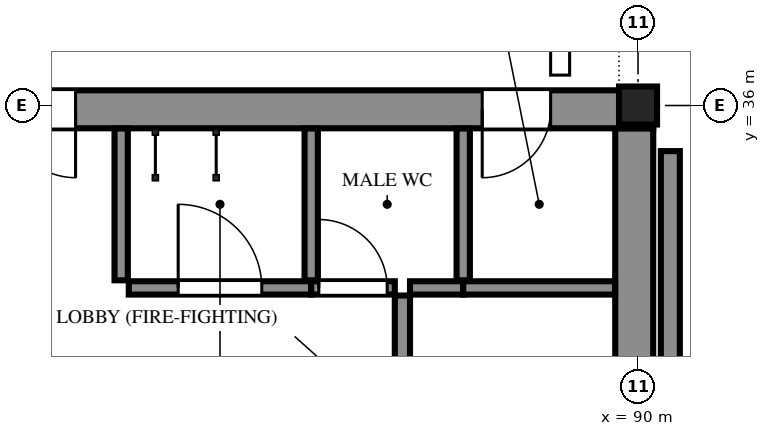
"""IFC4 building model, lengths in metres.
Left out: names, types, materials, properties, quantities, classifications, styles, units other than length and angle.
Written with IfcOpenShell. Run it as: python <this file> out.ifc"""

import sys

from ifc_helpers import new_model, si_unit, direction, frame, frame_2d, origin, origin_2d, place, context, subcontext, project, spatial, polyline, rectangle, hollow_rectangle, outline, extrude, element, fill, save


model = new_model("IFC4")
c1 = context("Model", 3, precision=1e-05, world=origin(), true_north=direction((0.0, 1.0)))
c2 = subcontext(c1, "Body", "Model", "MODEL_VIEW")
j1 = project(units=[si_unit("LENGTHUNIT", "METRE"), si_unit("PLANEANGLEUNIT", "RADIAN")], contexts=[c1])
p1 = place(None, origin())
s1 = spatial("IfcSite", under=j1, at=p1, CompositionType="ELEMENT")
p2 = place(p1, origin())
s2 = spatial("IfcBuilding", under=s1, at=p2, CompositionType="ELEMENT")
p3 = place(p2, frame((0.0, 0.0, 11.7)))
s3 = spatial("IfcBuildingStorey", under=s2, at=p3, CompositionType="ELEMENT", Elevation=11.7)
p4 = place(p3, frame((90.0, 36.0, 0.0), z_axis=(0.0, 0.0, 1.0), x_axis=(1.0, 0.0, 0.0)))
e1 = element("IfcColumn", 1, at=p4, inside=s3, PredefinedType="COLUMN", context=c2, shape_type="SweptSolid", body=[
    extrude(hollow_rectangle(XDim=0.5, YDim=0.5, WallThickness=0.032, at=origin_2d()), origin(), (0.0, 0.0, 1.0), 4.2),
])
p5 = place(p3, frame((71.8, 35.95, 0.0), z_axis=(0.0, 0.0, 1.0), x_axis=(1.0, 0.0, 0.0)))
e2 = element("IfcWall", 2, at=p5, inside=s3, PredefinedType="SOLIDWALL", context=c2, shape_type="SweptSolid", body=[
    extrude(rectangle(XDim=18.4, YDim=0.5, at=frame_2d((9.2, 0.0))), origin(), (0.0, 0.0, 1.0), 4.2),
])
p6 = place(p5, frame((1.5, 0.0, 0.0)))
e3 = element("IfcOpeningElement", 3, at=p6, cuts=e2, PredefinedType="OPENING", context=c2, shape_type="SweptSolid", body=[
    extrude(rectangle(XDim=1.8, YDim=2.1, at=frame_2d((0.9, 1.05))), frame((0.0, 0.26, 0.0), z_axis=(0.0, -1.0, 0.0), x_axis=(1.0, 0.0, 0.0)), (0.0, 0.0, 1.0), 0.52),
])
p7 = place(p5, frame((5.5, 0.0, 0.0)))
e4 = element("IfcOpeningElement", 4, at=p7, cuts=e2, PredefinedType="OPENING", context=c2, shape_type="SweptSolid", body=[
    extrude(rectangle(XDim=1.8, YDim=2.1, at=frame_2d((0.9, 1.05))), frame((0.0, 0.26, 0.0), z_axis=(0.0, -1.0, 0.0), x_axis=(1.0, 0.0, 0.0)), (0.0, 0.0, 1.0), 0.52),
])
p8 = place(p5, frame((9.0, 0.0, 0.0)))
e5 = element("IfcOpeningElement", 5, at=p8, cuts=e2, PredefinedType="OPENING", context=c2, shape_type="SweptSolid", body=[
    extrude(rectangle(XDim=1.8, YDim=2.1, at=frame_2d((0.9, 1.05))), frame((0.0, 0.26, 0.0), z_axis=(0.0, -1.0, 0.0), x_axis=(1.0, 0.0, 0.0)), (0.0, 0.0, 1.0), 0.52),
])
p9 = place(p5, frame((16.15, 0.0, 0.0)))
e6 = element("IfcOpeningElement", 6, at=p9, cuts=e2, PredefinedType="OPENING", context=c2, shape_type="SweptSolid", body=[
    extrude(rectangle(XDim=0.9, YDim=2.1, at=frame_2d((0.45, 1.05))), frame((0.0, 0.26, 0.0), z_axis=(0.0, -1.0, 0.0), x_axis=(1.0, 0.0, 0.0)), (0.0, 0.0, 1.0), 0.52),
])
p10 = place(p3, frame((89.95, 27.3, 0.0), z_axis=(0.0, 0.0, 1.0), x_axis=(0.0, 1.0, 0.0)))
e7 = element("IfcWall", 7, at=p10, inside=s3, PredefinedType="SOLIDWALL", context=c2, shape_type="SweptSolid", body=[
    extrude(rectangle(XDim=8.4, YDim=0.5, at=frame_2d((4.2, 0.0))), origin(), (0.0, 0.0, 1.0), 4.2),
])
p11 = place(p3, frame((90.425, 26.7, 0.0), z_axis=(0.0, 0.0, 1.0), x_axis=(0.0, 1.0, 0.0)))
e8 = element("IfcWall", 8, at=p11, inside=s3, PredefinedType="SOLIDWALL", context=c2, shape_type="SweptSolid", body=[
    extrude(outline(polyline([(0.0, 0.0), (8.7, 0.0), (8.7, 12.6), (0.0, 12.6), (0.0, 0.0)]), holes=[polyline([(2.056, 2.215), (2.076, 2.329), (2.108, 2.439), (2.152, 2.546), (2.208, 2.646), (2.275, 2.74), (2.352, 2.826), (2.438, 2.903), (2.532, 2.969), (2.633, 3.025), (2.739, 3.068), (2.85, 3.1), (2.961, 3.068), (3.067, 3.025), (3.168, 2.969), (3.262, 2.903), (3.348, 2.826), (3.425, 2.74), (3.492, 2.646), (3.548, 2.546), (3.592, 2.439), (3.624, 2.329), (3.644, 2.215), (3.65, 2.1), (3.65, 0.6), (2.05, 0.6), (2.05, 2.1), (2.056, 2.215)]), polyline([(5.076, 2.329), (5.108, 2.439), (5.152, 2.546), (5.208, 2.646), (5.275, 2.74), (5.352, 2.826), (5.438, 2.903), (5.532, 2.969), (5.633, 3.025), (5.739, 3.068), (5.85, 3.1), (5.961, 3.068), (6.067, 3.025), (6.168, 2.969), (6.262, 2.903), (6.348, 2.826), (6.425, 2.74), (6.492, 2.646), (6.548, 2.546), (6.592, 2.439), (6.624, 2.329), (6.644, 2.215), (6.65, 2.1), (6.65, 0.6), (5.05, 0.6), (5.05, 2.1), (5.056, 2.215), (5.076, 2.329)]), polyline([(2.076, 6.529), (2.108, 6.639), (2.152, 6.746), (2.208, 6.846), (2.275, 6.94), (2.352, 7.026), (2.438, 7.103), (2.532, 7.169), (2.633, 7.225), (2.739, 7.269), (2.85, 7.3), (2.961, 7.269), (3.067, 7.225), (3.168, 7.169), (3.262, 7.103), (3.348, 7.026), (3.425, 6.94), (3.492, 6.846), (3.548, 6.746), (3.592, 6.639), (3.624, 6.529), (3.644, 6.415), (3.65, 6.3), (3.65, 4.8), (2.05, 4.8), (2.05, 6.3), (2.056, 6.415), (2.076, 6.529)]), polyline([(5.056, 6.415), (5.076, 6.529), (5.108, 6.639), (5.152, 6.746), (5.208, 6.846), (5.275, 6.94), (5.352, 7.026), (5.438, 7.103), (5.532, 7.169), (5.633, 7.225), (5.739, 7.269), (5.85, 7.3), (5.961, 7.269), (6.067, 7.225), (6.168, 7.169), (6.262, 7.103), (6.348, 7.026), (6.425, 6.94), (6.492, 6.846), (6.548, 6.746), (6.592, 6.639), (6.624, 6.529), (6.644, 6.415), (6.65, 6.3), (6.65, 4.8), (5.05, 4.8), (5.05, 6.3), (5.056, 6.415)]), polyline([(2.076, 10.729), (2.108, 10.839), (2.152, 10.946), (2.208, 11.046), (2.275, 11.14), (2.352, 11.226), (2.438, 11.303), (2.532, 11.369), (2.633, 11.425), (2.739, 11.469), (2.85, 11.5), (2.961, 11.469), (3.067, 11.425), (3.168, 11.369), (3.262, 11.303), (3.348, 11.226), (3.425, 11.14), (3.492, 11.046), (3.548, 10.946), (3.592, 10.839), (3.624, 10.729), (3.644, 10.615), (3.65, 10.5), (3.65, 9.0), (2.05, 9.0), (2.05, 10.5), (2.056, 10.615), (2.076, 10.729)]), polyline([(5.076, 10.729), (5.108, 10.839), (5.152, 10.946), (5.208, 11.046), (5.275, 11.14), (5.352, 11.226), (5.438, 11.303), (5.532, 11.369), (5.633, 11.425), (5.739, 11.469), (5.85, 11.5), (5.961, 11.469), (6.067, 11.425), (6.168, 11.369), (6.262, 11.303), (6.348, 11.226), (6.425, 11.14), (6.492, 11.046), (6.548, 10.946), (6.592, 10.839), (6.624, 10.729), (6.644, 10.615), (6.65, 10.5), (6.65, 9.0), (5.05, 9.0), (5.05, 10.5), (5.056, 10.615), (5.076, 10.729)])]), frame((0.0, 0.125, 0.0), z_axis=(0.0, -1.0, 0.0), x_axis=(1.0, 0.0, 0.0)), (0.0, 0.0, 1.0), 0.25),
])
p12 = place(p3, frame((86.9, 33.5, 0.0), z_axis=(0.0, 0.0, 1.0), x_axis=(0.0, -1.0, 0.0)))
e9 = element("IfcWall", 9, at=p12, inside=s3, PredefinedType="PARTITIONING", context=c2, shape_type="SweptSolid", body=[
    extrude(rectangle(XDim=3.1, YDim=0.2, at=frame_2d((1.55, 0.0))), origin(), (0.0, 0.0, 1.0), 3.382),
])
p13 = place(p12, frame((0.9, 0.0, 0.0)))
e10 = element("IfcOpeningElement", 10, at=p13, cuts=e9, PredefinedType="OPENING", context=c2, shape_type="SweptSolid", body=[
    extrude(rectangle(XDim=1.2, YDim=2.1, at=frame_2d((0.6, 1.05))), frame((0.0, 0.11, 0.0), z_axis=(0.0, -1.0, 0.0), x_axis=(1.0, 0.0, 0.0)), (0.0, 0.0, 1.0), 0.22),
])
p14 = place(p3, frame((83.2, 35.698, 0.0), z_axis=(0.0, 0.0, 1.0), x_axis=(0.0, -1.0, 0.0)))
e11 = element("IfcWall", 11, at=p14, inside=s3, PredefinedType="PARTITIONING", context=c2, shape_type="SweptSolid", body=[
    extrude(rectangle(XDim=1.998, YDim=0.175, at=frame_2d((0.999, 0.0))), origin(), (0.0, 0.0, 1.0), 3.307),
])
p15 = place(p3, frame((83.3, 33.6, 0.0), z_axis=(0.0, 0.0, 1.0), x_axis=(1.0, 0.0, 0.0)))
e12 = element("IfcWall", 12, at=p15, inside=s3, PredefinedType="PARTITIONING", context=c2, shape_type="SweptSolid", body=[
    extrude(rectangle(XDim=2.4, YDim=0.175, at=frame_2d((1.2, 0.0))), origin(), (0.0, 0.0, 1.0), 3.307),
])
p16 = place(p15, frame((0.65, 0.0, 0.0)))
e13 = element("IfcOpeningElement", 13, at=p16, cuts=e12, PredefinedType="OPENING", context=c2, shape_type="SweptSolid", body=[
    extrude(rectangle(XDim=1.1, YDim=2.1, at=frame_2d((0.55, 1.05))), frame((0.0, 0.097, 0.0), z_axis=(0.0, -1.0, 0.0), x_axis=(1.0, 0.0, 0.0)), (0.0, 0.0, 1.0), 0.195),
])
p17 = place(p3, frame((85.7, 33.6, 0.0), z_axis=(0.0, 0.0, 1.0), x_axis=(1.0, 0.0, 0.0)))
e14 = element("IfcWall", 14, at=p17, inside=s3, PredefinedType="PARTITIONING", context=c2, shape_type="SweptSolid", body=[
    extrude(rectangle(XDim=1.1, YDim=0.175, at=frame_2d((0.55, 0.0))), origin(), (0.0, 0.0, 1.0), 3.307),
])
p18 = place(p17, frame((0.1, 0.0, 0.0)))
e15 = element("IfcOpeningElement", 15, at=p18, cuts=e14, PredefinedType="OPENING", context=c2, shape_type="SweptSolid", body=[
    extrude(rectangle(XDim=0.9, YDim=2.1, at=frame_2d((0.45, 1.05))), frame((0.0, 0.097, 0.0), z_axis=(0.0, -1.0, 0.0), x_axis=(1.0, 0.0, 0.0)), (0.0, 0.0, 1.0), 0.195),
])
p19 = place(p3, frame((87.0, 33.6, 0.0), z_axis=(0.0, 0.0, 1.0), x_axis=(1.0, 0.0, 0.0)))
e16 = element("IfcWall", 16, at=p19, inside=s3, PredefinedType="PARTITIONING", context=c2, shape_type="SweptSolid", body=[
    extrude(rectangle(XDim=0.7, YDim=0.175, at=frame_2d((0.35, 0.0))), origin(), (0.0, 0.0, 1.0), 3.307),
])
for number, where, z_axis, x_axis in (
    (17, (87.7, 33.6, 0.0), (0.0, 0.0, 1.0), (1.0, 0.0, 0.0)),
    (18, (85.7, 35.698, 0.0), (0.0, 0.0, 1.0), (0.0, -1.0, 0.0)),
    (19, (87.7, 35.698, 0.0), (0.0, 0.0, 1.0), (0.0, -1.0, 0.0)),
):
    element("IfcWall", number, at=place(p3, frame(where, z_axis=z_axis, x_axis=x_axis)), inside=s3, PredefinedType="PARTITIONING", context=c2, shape_type="SweptSolid", body=[
        extrude(rectangle(XDim=1.998, YDim=0.175, at=frame_2d((0.999, 0.0))), origin(), (0.0, 0.0, 1.0), 3.307),
    ])
p20 = place(p8, frame((1.8, 0.0, 0.0), z_axis=(0.0, 0.0, 1.0), x_axis=(-1.0, 0.0, 0.0)))
e20 = element("IfcDoor", 20, at=p20, inside=s3, OperationType="DOUBLE_DOOR_SINGLE_SWING", PredefinedType="DOOR", context=c2, shape_type="SweptSolid", body=[
    extrude(outline(polyline([(0.0, 0.0), (0.07, 0.0), (0.07, 2.03), (1.73, 2.03), (1.73, 0.0), (1.8, 0.0), (1.8, 2.1), (0.0, 2.1), (0.0, 0.0)])), frame((0.0, 0.025, 0.0), z_axis=(0.0, -1.0, 0.0), x_axis=(1.0, 0.0, 0.0)), (0.0, 0.0, 1.0), 0.05),
    extrude(outline(polyline([(0.074, 0.01), (0.897, 0.01), (0.897, 2.026), (0.074, 2.026), (0.074, 0.01)]), holes=[polyline([(0.194, 0.16), (0.777, 0.16), (0.777, 1.01), (0.194, 1.01), (0.194, 0.16)]), polyline([(0.335, 1.16), (0.635, 1.16), (0.635, 1.76), (0.335, 1.76), (0.335, 1.16)])]), frame((0.0, 0.017, 0.0), z_axis=(0.0, -1.0, 0.0), x_axis=(1.0, 0.0, 0.0)), (0.0, 0.0, 1.0), 0.035),
    extrude(rectangle(XDim=0.583, YDim=0.85, at=frame_2d((0.485, 0.585))), frame((0.0, 0.009, 0.0), z_axis=(0.0, -1.0, 0.0), x_axis=(1.0, 0.0, 0.0)), (0.0, 0.0, 1.0), 0.017),
    extrude(rectangle(XDim=0.3, YDim=0.6, at=frame_2d((0.485, 1.46))), frame((0.0, 0.006, 0.0), z_axis=(0.0, -1.0, 0.0), x_axis=(1.0, 0.0, 0.0)), (0.0, 0.0, 1.0), 0.012),
    extrude(outline(polyline([(0.903, 0.01), (1.726, 0.01), (1.726, 2.026), (0.903, 2.026), (0.903, 0.01)]), holes=[polyline([(1.023, 0.16), (1.606, 0.16), (1.606, 1.01), (1.023, 1.01), (1.023, 0.16)]), polyline([(1.165, 1.16), (1.465, 1.16), (1.465, 1.76), (1.165, 1.76), (1.165, 1.16)])]), frame((0.0, 0.017, 0.0), z_axis=(0.0, -1.0, 0.0), x_axis=(1.0, 0.0, 0.0)), (0.0, 0.0, 1.0), 0.035),
    extrude(rectangle(XDim=0.583, YDim=0.85, at=frame_2d((1.314, 0.585))), frame((0.0, 0.009, 0.0), z_axis=(0.0, -1.0, 0.0), x_axis=(1.0, 0.0, 0.0)), (0.0, 0.0, 1.0), 0.017),
    extrude(rectangle(XDim=0.3, YDim=0.6, at=frame_2d((1.314, 1.46))), frame((0.0, 0.006, 0.0), z_axis=(0.0, -1.0, 0.0), x_axis=(1.0, 0.0, 0.0)), (0.0, 0.0, 1.0), 0.012),
])
fill(e5, e20)
p21 = place(p16, origin())
e21 = element("IfcDoor", 21, at=p21, inside=s3, OperationType="SINGLE_SWING_LEFT", PredefinedType="DOOR", context=c2, shape_type="SweptSolid", body=[
    extrude(outline(polyline([(0.0, 0.0), (0.07, 0.0), (0.07, 2.03), (1.03, 2.03), (1.03, 0.0), (1.1, 0.0), (1.1, 2.1), (0.0, 2.1), (0.0, 0.0)])), frame((0.0, 0.025, 0.0), z_axis=(0.0, -1.0, 0.0), x_axis=(1.0, 0.0, 0.0)), (0.0, 0.0, 1.0), 0.05),
    extrude(outline(polyline([(0.074, 0.01), (1.026, 0.01), (1.026, 2.026), (0.074, 2.026), (0.074, 0.01)]), holes=[polyline([(0.194, 0.16), (0.906, 0.16), (0.906, 1.01), (0.194, 1.01), (0.194, 0.16)]), polyline([(0.4, 1.16), (0.7, 1.16), (0.7, 1.76), (0.4, 1.76), (0.4, 1.16)])]), frame((0.0, 0.017, 0.0), z_axis=(0.0, -1.0, 0.0), x_axis=(1.0, 0.0, 0.0)), (0.0, 0.0, 1.0), 0.035),
    extrude(rectangle(XDim=0.712, YDim=0.85, at=frame_2d((0.55, 0.585))), frame((0.0, 0.009, 0.0), z_axis=(0.0, -1.0, 0.0), x_axis=(1.0, 0.0, 0.0)), (0.0, 0.0, 1.0), 0.017),
    extrude(rectangle(XDim=0.3, YDim=0.6, at=frame_2d((0.55, 1.46))), frame((0.0, 0.006, 0.0), z_axis=(0.0, -1.0, 0.0), x_axis=(1.0, 0.0, 0.0)), (0.0, 0.0, 1.0), 0.012),
])
fill(e13, e21)
p22 = place(p18, origin())
e22 = element("IfcDoor", 22, at=p22, inside=s3, OperationType="SINGLE_SWING_LEFT", PredefinedType="DOOR", context=c2, shape_type="SweptSolid", body=[
    extrude(outline(polyline([(0.0, 0.0), (0.07, 0.0), (0.07, 2.03), (0.83, 2.03), (0.83, 0.0), (0.9, 0.0), (0.9, 2.1), (0.0, 2.1), (0.0, 0.0)])), frame((0.0, 0.025, 0.0), z_axis=(0.0, -1.0, 0.0), x_axis=(1.0, 0.0, 0.0)), (0.0, 0.0, 1.0), 0.05),
    extrude(outline(polyline([(0.074, 0.01), (0.826, 0.01), (0.826, 2.026), (0.074, 2.026), (0.074, 0.01)]), holes=[polyline([(0.194, 0.16), (0.706, 0.16), (0.706, 1.01), (0.194, 1.01), (0.194, 0.16)]), polyline([(0.3, 1.16), (0.6, 1.16), (0.6, 1.76), (0.3, 1.76), (0.3, 1.16)])]), frame((0.0, 0.017, 0.0), z_axis=(0.0, -1.0, 0.0), x_axis=(1.0, 0.0, 0.0)), (0.0, 0.0, 1.0), 0.035),
    extrude(rectangle(XDim=0.512, YDim=0.85, at=frame_2d((0.45, 0.585))), frame((0.0, 0.009, 0.0), z_axis=(0.0, -1.0, 0.0), x_axis=(1.0, 0.0, 0.0)), (0.0, 0.0, 1.0), 0.017),
    extrude(rectangle(XDim=0.3, YDim=0.6, at=frame_2d((0.45, 1.46))), frame((0.0, 0.006, 0.0), z_axis=(0.0, -1.0, 0.0), x_axis=(1.0, 0.0, 0.0)), (0.0, 0.0, 1.0), 0.012),
])
fill(e15, e22)
p23 = place(p9, frame((0.9, 0.0, 0.0), z_axis=(0.0, 0.0, 1.0), x_axis=(-1.0, 0.0, 0.0)))
e23 = element("IfcDoor", 23, at=p23, inside=s3, OperationType="SINGLE_SWING_RIGHT", PredefinedType="DOOR", context=c2, shape_type="SweptSolid", body=[
    extrude(outline(polyline([(0.0, 0.0), (0.07, 0.0), (0.07, 2.03), (0.83, 2.03), (0.83, 0.0), (0.9, 0.0), (0.9, 2.1), (0.0, 2.1), (0.0, 0.0)])), frame((0.0, 0.025, 0.0), z_axis=(0.0, -1.0, 0.0), x_axis=(1.0, 0.0, 0.0)), (0.0, 0.0, 1.0), 0.05),
    extrude(outline(polyline([(0.074, 0.01), (0.826, 0.01), (0.826, 2.026), (0.074, 2.026), (0.074, 0.01)]), holes=[polyline([(0.194, 0.16), (0.706, 0.16), (0.706, 1.01), (0.194, 1.01), (0.194, 0.16)]), polyline([(0.3, 1.16), (0.6, 1.16), (0.6, 1.76), (0.3, 1.76), (0.3, 1.16)])]), frame((0.0, 0.017, 0.0), z_axis=(0.0, -1.0, 0.0), x_axis=(1.0, 0.0, 0.0)), (0.0, 0.0, 1.0), 0.035),
    extrude(rectangle(XDim=0.512, YDim=0.85, at=frame_2d((0.45, 0.585))), frame((0.0, 0.009, 0.0), z_axis=(0.0, -1.0, 0.0), x_axis=(1.0, 0.0, 0.0)), (0.0, 0.0, 1.0), 0.017),
    extrude(rectangle(XDim=0.3, YDim=0.6, at=frame_2d((0.45, 1.46))), frame((0.0, 0.006, 0.0), z_axis=(0.0, -1.0, 0.0), x_axis=(1.0, 0.0, 0.0)), (0.0, 0.0, 1.0), 0.012),
])
fill(e6, e23)
save(model, sys.argv[1])
